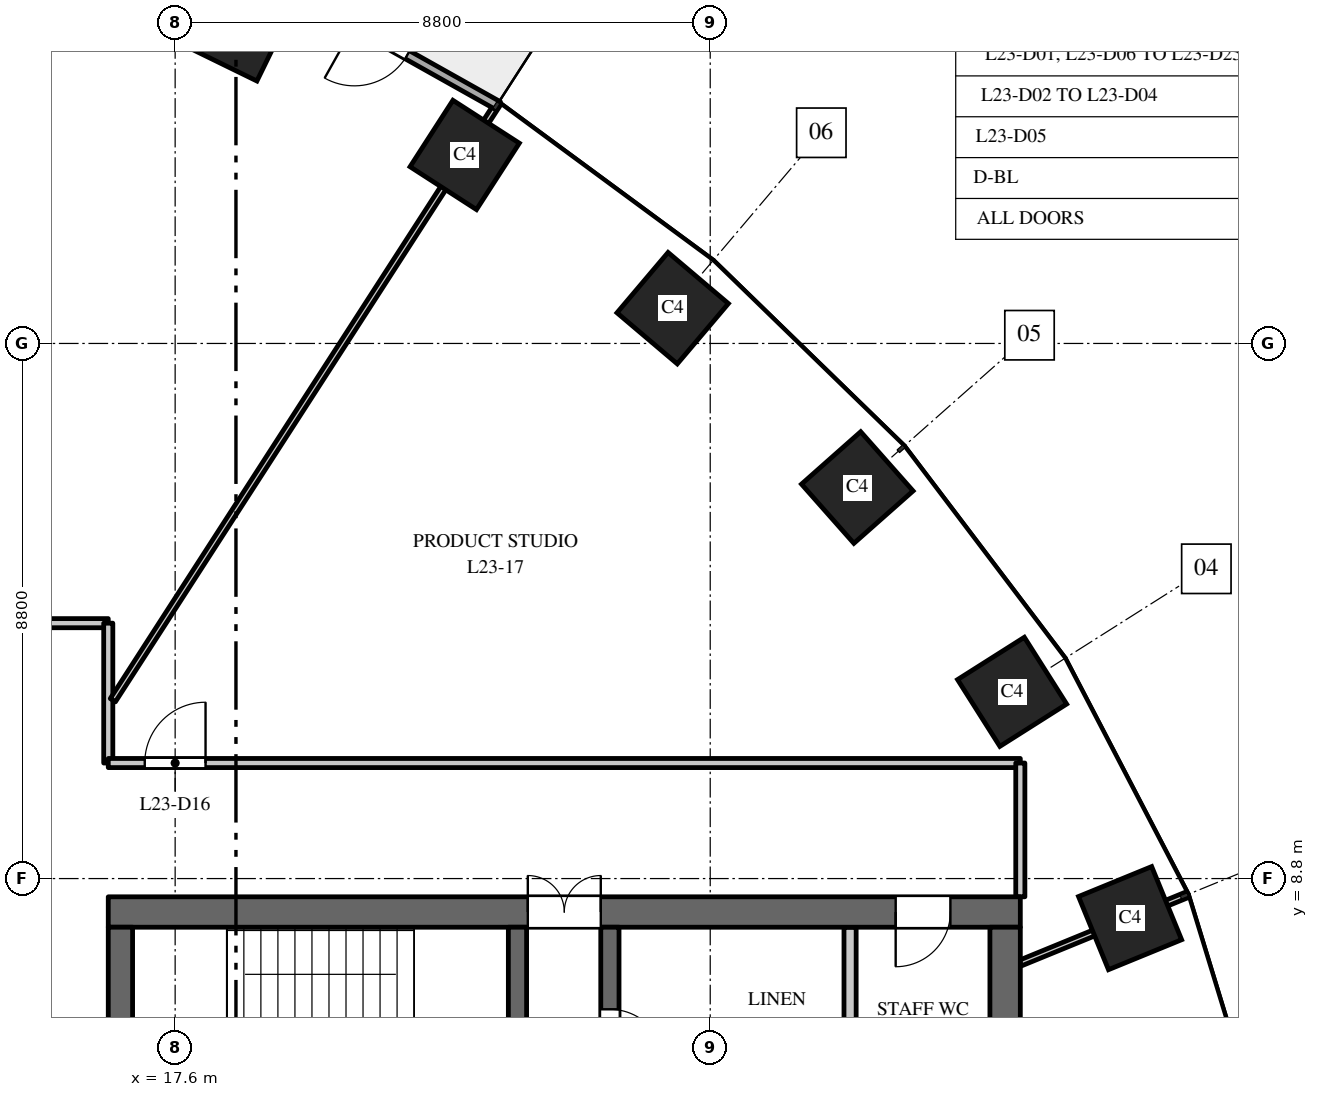
"""IFC4 building model, lengths in metres.
Left out: names, types, materials, properties, quantities, classifications, styles, units other than length and angle.
Written with IfcOpenShell. Run it as: python <this file> out.ifc"""

import sys

from ifc_helpers import new_model, si_unit, direction, frame, frame_2d, origin, origin_2d, place, context, subcontext, project, spatial, rectangle, extrude, element, fill, save


model = new_model("IFC4")
c1 = context("Model", 3, precision=1e-05, world=origin(), true_north=direction((0.0, 1.0)))
c2 = subcontext(c1, "Body", "Model", "MODEL_VIEW")
j1 = project(units=[si_unit("LENGTHUNIT", "METRE"), si_unit("PLANEANGLEUNIT", "RADIAN")], contexts=[c1])
p1 = place(None, origin())
s1 = spatial("IfcSite", under=j1, at=p1, CompositionType="ELEMENT")
p2 = place(p1, origin())
s2 = spatial("IfcBuilding", under=s1, at=p2, CompositionType="ELEMENT")
p3 = place(p2, frame((0.0, 0.0, 104.0)))
s3 = spatial("IfcBuildingStorey", under=s2, at=p3, CompositionType="ELEMENT", Elevation=104.0)
for number, where, z_axis, x_axis in (
    (1, (33.305, 8.149, 0.0), (0.0, 0.0, 1.0), (-0.379, 0.925, 0.0)),
    (2, (31.365, 11.871, 0.0), (0.0, 0.0, 1.0), (-0.535, 0.845, 0.0)),
    (3, (28.819, 15.23, 0.0), (0.0, 0.0, 1.0), (-0.663, 0.749, 0.0)),
    (4, (25.783, 18.18, 0.0), (0.0, 0.0, 1.0), (-0.763, 0.646, 0.0)),
    (5, (22.362, 20.7, 0.0), (0.0, 0.0, 1.0), (-0.84, 0.542, 0.0)),
    (6, (18.646, 22.785, 0.0), (0.0, 0.0, 1.0), (-0.898, 0.439, 0.0)),
):
    element("IfcColumn", number, at=place(p3, frame(where, z_axis=z_axis, x_axis=x_axis)), inside=s3, PredefinedType="COLUMN", context=c2, shape_type="SweptSolid", body=[
        extrude(rectangle(XDim=1.3, YDim=1.3, at=origin_2d()), origin(), (0.0, 0.0, 1.0), 4.0),
    ])
p4 = place(p3, frame((16.5, 8.25, 0.0), z_axis=(0.0, 0.0, 1.0), x_axis=(1.0, 0.0, 0.0)))
e7 = element("IfcWall", 7, at=p4, inside=s3, PredefinedType="SHEAR", context=c2, shape_type="SweptSolid", body=[
    extrude(rectangle(XDim=15.0, YDim=0.5, at=frame_2d((7.5, 0.0))), origin(), (0.0, 0.0, 1.0), 3.7),
])
p5 = place(p4, frame((6.9, 0.0, 0.0)))
e8 = element("IfcOpeningElement", 8, at=p5, cuts=e7, PredefinedType="OPENING", context=c2, shape_type="SweptSolid", body=[
    extrude(rectangle(XDim=1.2, YDim=2.1, at=frame_2d((0.6, 1.05))), frame((0.0, 0.26, 0.0), z_axis=(0.0, -1.0, 0.0), x_axis=(1.0, 0.0, 0.0)), (0.0, 0.0, 1.0), 0.52),
])
p6 = place(p4, frame((12.95, 0.0, 0.0)))
e9 = element("IfcOpeningElement", 9, at=p6, cuts=e7, PredefinedType="OPENING", context=c2, shape_type="SweptSolid", body=[
    extrude(rectangle(XDim=0.9, YDim=2.1, at=frame_2d((0.45, 1.05))), frame((0.0, 0.26, 0.0), z_axis=(0.0, -1.0, 0.0), x_axis=(1.0, 0.0, 0.0)), (0.0, 0.0, 1.0), 0.52),
])
p7 = place(p3, frame((24.75, -8.0, 0.0), z_axis=(0.0, 0.0, 1.0), x_axis=(0.0, 1.0, 0.0)))
e10 = element("IfcWall", 10, at=p7, inside=s3, PredefinedType="SHEAR", context=c2, shape_type="SweptSolid", body=[
    extrude(rectangle(XDim=16.0, YDim=0.3, at=frame_2d((8.0, 0.0))), origin(), (0.0, 0.0, 1.0), 3.7),
])
p8 = place(p7, frame((4.425, 0.0, 0.0)))
e11 = element("IfcOpeningElement", 11, at=p8, cuts=e10, PredefinedType="OPENING", context=c2, shape_type="SweptSolid", body=[
    extrude(rectangle(XDim=1.1, YDim=2.1, at=frame_2d((0.55, 1.05))), frame((0.0, 0.16, 0.0), z_axis=(0.0, -1.0, 0.0), x_axis=(1.0, 0.0, 0.0)), (0.0, 0.0, 1.0), 0.32),
])
p9 = place(p7, frame((7.45, 0.0, 0.0)))
e12 = element("IfcOpeningElement", 12, at=p9, cuts=e10, PredefinedType="OPENING", context=c2, shape_type="SweptSolid", body=[
    extrude(rectangle(XDim=1.1, YDim=2.1, at=frame_2d((0.55, 1.05))), frame((0.0, 0.16, 0.0), z_axis=(0.0, -1.0, 0.0), x_axis=(1.0, 0.0, 0.0)), (0.0, 0.0, 1.0), 0.32),
])
p10 = place(p7, frame((10.425, 0.0, 0.0)))
e13 = element("IfcOpeningElement", 13, at=p10, cuts=e10, PredefinedType="OPENING", context=c2, shape_type="SweptSolid", body=[
    extrude(rectangle(XDim=1.2, YDim=2.1, at=frame_2d((0.6, 1.05))), frame((0.0, 0.16, 0.0), z_axis=(0.0, -1.0, 0.0), x_axis=(1.0, 0.0, 0.0)), (0.0, 0.0, 1.0), 0.32),
])
p11 = place(p7, frame((13.75, 0.0, 0.0)))
e14 = element("IfcOpeningElement", 14, at=p11, cuts=e10, PredefinedType="OPENING", context=c2, shape_type="SweptSolid", body=[
    extrude(rectangle(XDim=0.9, YDim=2.1, at=frame_2d((0.45, 1.05))), frame((0.0, 0.16, 0.0), z_axis=(0.0, -1.0, 0.0), x_axis=(1.0, 0.0, 0.0)), (0.0, 0.0, 1.0), 0.32),
])
p12 = place(p7, frame((1.975, 0.0, 0.0)))
e15 = element("IfcOpeningElement", 15, at=p12, cuts=e10, PredefinedType="OPENING", context=c2, shape_type="SweptSolid", body=[
    extrude(rectangle(XDim=0.9, YDim=2.1, at=frame_2d((0.45, 1.05))), frame((0.0, 0.16, 0.0), z_axis=(0.0, -1.0, 0.0), x_axis=(1.0, 0.0, 0.0)), (0.0, 0.0, 1.0), 0.32),
])
p13 = place(p7, frame((0.35, 0.0, 0.0)))
e16 = element("IfcOpeningElement", 16, at=p13, cuts=e10, PredefinedType="OPENING", context=c2, shape_type="SweptSolid", body=[
    extrude(rectangle(XDim=0.9, YDim=2.1, at=frame_2d((0.45, 1.05))), frame((0.0, 0.16, 0.0), z_axis=(0.0, -1.0, 0.0), x_axis=(1.0, 0.0, 0.0)), (0.0, 0.0, 1.0), 0.32),
])
p14 = place(p3, frame((16.7, -8.0, 0.0), z_axis=(0.0, 0.0, 1.0), x_axis=(0.0, 1.0, 0.0)))
e17 = element("IfcWall", 17, at=p14, inside=s3, PredefinedType="SHEAR", context=c2, shape_type="SweptSolid", body=[
    extrude(rectangle(XDim=16.0, YDim=0.4, at=frame_2d((8.0, 0.0))), origin(), (0.0, 0.0, 1.0), 3.7),
])
p15 = place(p3, frame((31.25, -8.0, 0.0), z_axis=(0.0, 0.0, 1.0), x_axis=(0.0, 1.0, 0.0)))
e18 = element("IfcWall", 18, at=p15, inside=s3, PredefinedType="SHEAR", context=c2, shape_type="SweptSolid", body=[
    extrude(rectangle(XDim=16.0, YDim=0.5, at=frame_2d((8.0, 0.0))), origin(), (0.0, 0.0, 1.0), 3.7),
])
p16 = place(p3, frame((28.7, 4.75, 0.0), z_axis=(0.0, 0.0, 1.0), x_axis=(0.0, 1.0, 0.0)))
e19 = element("IfcWall", 19, at=p16, inside=s3, PredefinedType="PARTITIONING", context=c2, shape_type="SweptSolid", body=[
    extrude(rectangle(XDim=3.25, YDim=0.2, at=frame_2d((1.625, 0.0))), origin(), (0.0, 0.0, 1.0), 3.7),
])
p17 = place(p3, frame((23.23, 2.25, 0.0), z_axis=(0.0, 0.0, 1.0), x_axis=(0.0, 1.0, 0.0)))
e20 = element("IfcWall", 20, at=p17, inside=s3, PredefinedType="SHEAR", context=c2, shape_type="SweptSolid", body=[
    extrude(rectangle(XDim=5.75, YDim=0.3, at=frame_2d((2.875, 0.0))), origin(), (0.0, 0.0, 1.0), 3.7),
])
p18 = place(p17, frame((0.6, 0.0, 0.0)))
e21 = element("IfcOpeningElement", 21, at=p18, cuts=e20, PredefinedType="OPENING", context=c2, shape_type="SweptSolid", body=[
    extrude(rectangle(XDim=1.0, YDim=2.1, at=frame_2d((0.5, 1.05))), frame((0.0, 0.16, 0.0), z_axis=(0.0, -1.0, 0.0), x_axis=(1.0, 0.0, 0.0)), (0.0, 0.0, 1.0), 0.32),
])
p19 = place(p3, frame((22.913, 21.509, 0.0), z_axis=(0.0, 0.0, 1.0), x_axis=(-0.872046572975, 0.489422899509, 0.0)))
e22 = element("IfcWall", 22, at=p19, inside=s3, PredefinedType="STANDARD", context=c2, shape_type="SweptSolid", body=[
    extrude(rectangle(XDim=4.426, YDim=0.15, at=frame_2d((2.213, 0.0))), origin(), (0.0, 0.0, 1.0), 3.7),
])
p20 = place(p19, frame((1.713, 0.0, 0.0)))
e23 = element("IfcOpeningElement", 23, at=p20, cuts=e22, PredefinedType="OPENING", context=c2, shape_type="SweptSolid", body=[
    extrude(rectangle(XDim=1.0, YDim=2.4, at=frame_2d((0.5, 1.2))), frame((0.0, 0.085, 0.0), z_axis=(0.0, -1.0, 0.0), x_axis=(1.0, 0.0, 0.0)), (0.0, 0.0, 1.0), 0.17),
])
p21 = place(p3, frame((4.479, 13.0, 0.0), z_axis=(0.0, 0.0, 1.0), x_axis=(1.0, 0.0, 0.0)))
e24 = element("IfcWall", 24, at=p21, inside=s3, PredefinedType="PARTITIONING", context=c2, shape_type="SweptSolid", body=[
    extrude(rectangle(XDim=12.021, YDim=0.15, at=frame_2d((6.01, 0.0))), origin(), (0.0, 0.0, 1.0), 2.85),
])
p22 = place(p21, frame((0.621, 0.0, 0.0)))
e25 = element("IfcOpeningElement", 25, at=p22, cuts=e24, PredefinedType="OPENING", context=c2, shape_type="SweptSolid", body=[
    extrude(rectangle(XDim=1.0, YDim=2.1, at=frame_2d((0.5, 1.05))), frame((0.0, 0.085, 0.0), z_axis=(0.0, -1.0, 0.0), x_axis=(1.0, 0.0, 0.0)), (0.0, 0.0, 1.0), 0.17),
])
p23 = place(p3, frame((16.5, 10.7, 0.0), z_axis=(0.0, 0.0, 1.0), x_axis=(0.0, 1.0, 0.0)))
e26 = element("IfcWall", 26, at=p23, inside=s3, PredefinedType="PARTITIONING", context=c2, shape_type="SweptSolid", body=[
    extrude(rectangle(XDim=2.3, YDim=0.15, at=frame_2d((1.15, 0.0))), origin(), (0.0, 0.0, 1.0), 3.7),
])
p24 = place(p3, frame((16.5, 10.7, 0.0), z_axis=(0.0, 0.0, 1.0), x_axis=(1.0, 0.0, 0.0)))
e27 = element("IfcWall", 27, at=p24, inside=s3, PredefinedType="PARTITIONING", context=c2, shape_type="SweptSolid", body=[
    extrude(rectangle(XDim=15.0, YDim=0.15, at=frame_2d((7.5, 0.0))), origin(), (0.0, 0.0, 1.0), 2.75),
])
p25 = place(p24, frame((0.6, 0.0, 0.0)))
e28 = element("IfcOpeningElement", 28, at=p25, cuts=e27, PredefinedType="OPENING", context=c2, shape_type="SweptSolid", body=[
    extrude(rectangle(XDim=1.0, YDim=2.1, at=frame_2d((0.5, 1.05))), frame((0.0, 0.085, 0.0), z_axis=(0.0, -1.0, 0.0), x_axis=(1.0, 0.0, 0.0)), (0.0, 0.0, 1.0), 0.17),
])
p26 = place(p3, frame((16.575, 11.733, 0.0), z_axis=(0.0, 0.0, 1.0), x_axis=(0.54222594427, 0.840232720953, 0.0)))
e29 = element("IfcWall", 29, at=p26, inside=s3, PredefinedType="PARTITIONING", context=c2, shape_type="SweptSolid", body=[
    extrude(rectangle(XDim=11.674, YDim=0.1, at=frame_2d((5.837, 0.0))), origin(), (0.0, 0.0, 1.0), 3.7),
])
p27 = place(p3, frame((31.5, 7.41, 0.0), z_axis=(0.0, 0.0, 1.0), x_axis=(0.925344112436, 0.379128307542, 0.0)))
e30 = element("IfcWall", 30, at=p27, inside=s3, PredefinedType="PARTITIONING", context=c2, shape_type="SweptSolid", body=[
    extrude(rectangle(XDim=2.954, YDim=0.1, at=frame_2d((1.477, 0.0))), origin(), (0.0, 0.0, 1.0), 3.7),
])
p28 = place(p3, frame((31.5, 8.5, 0.0), z_axis=(0.0, 0.0, 1.0), x_axis=(0.0, 1.0, 0.0)))
e31 = element("IfcWall", 31, at=p28, inside=s3, PredefinedType="PARTITIONING", context=c2, shape_type="SweptSolid", body=[
    extrude(rectangle(XDim=2.2, YDim=0.15, at=frame_2d((1.1, 0.0))), origin(), (0.0, 0.0, 1.0), 2.9),
])
p29 = place(p5, origin())
e32 = element("IfcDoor", 32, at=p29, inside=s3, OperationType="DOUBLE_DOOR_DOUBLE_SWING", PredefinedType="DOOR", context=c2, shape_type="SweptSolid", body=[
    extrude(rectangle(XDim=1.2, YDim=2.1, at=frame_2d((0.6, 1.05))), frame((0.0, 0.025, 0.0), z_axis=(0.0, -1.0, 0.0), x_axis=(1.0, 0.0, 0.0)), (0.0, 0.0, 1.0), 0.05),
])
fill(e8, e32)
p30 = place(p11, origin())
e33 = element("IfcDoor", 33, at=p30, inside=s3, OperationType="SINGLE_SWING_LEFT", PredefinedType="DOOR", context=c2, shape_type="SweptSolid", body=[
    extrude(rectangle(XDim=0.9, YDim=2.1, at=frame_2d((0.45, 1.05))), frame((0.0, 0.025, 0.0), z_axis=(0.0, -1.0, 0.0), x_axis=(1.0, 0.0, 0.0)), (0.0, 0.0, 1.0), 0.05),
])
fill(e14, e33)
p31 = place(p6, origin())
e34 = element("IfcDoor", 34, at=p31, inside=s3, OperationType="SINGLE_SWING_LEFT", PredefinedType="DOOR", context=c2, shape_type="SweptSolid", body=[
    extrude(rectangle(XDim=0.9, YDim=2.1, at=frame_2d((0.45, 1.05))), frame((0.0, 0.025, 0.0), z_axis=(0.0, -1.0, 0.0), x_axis=(1.0, 0.0, 0.0)), (0.0, 0.0, 1.0), 0.05),
])
fill(e9, e34)
p32 = place(p20, origin())
e35 = element("IfcDoor", 35, at=p32, inside=s3, OperationType="SINGLE_SWING_RIGHT", PredefinedType="DOOR", context=c2, shape_type="SweptSolid", body=[
    extrude(rectangle(XDim=1.0, YDim=2.4, at=frame_2d((0.5, 1.2))), frame((0.0, 0.025, 0.0), z_axis=(0.0, -1.0, 0.0), x_axis=(1.0, 0.0, 0.0)), (0.0, 0.0, 1.0), 0.05),
])
fill(e23, e35)
p33 = place(p25, origin())
e36 = element("IfcDoor", 36, at=p33, inside=s3, OperationType="SINGLE_SWING_RIGHT", PredefinedType="DOOR", context=c2, shape_type="SweptSolid", body=[
    extrude(rectangle(XDim=1.0, YDim=2.1, at=frame_2d((0.5, 1.05))), frame((0.0, 0.025, 0.0), z_axis=(0.0, -1.0, 0.0), x_axis=(1.0, 0.0, 0.0)), (0.0, 0.0, 1.0), 0.05),
])
fill(e28, e36)
save(model, sys.argv[1])
